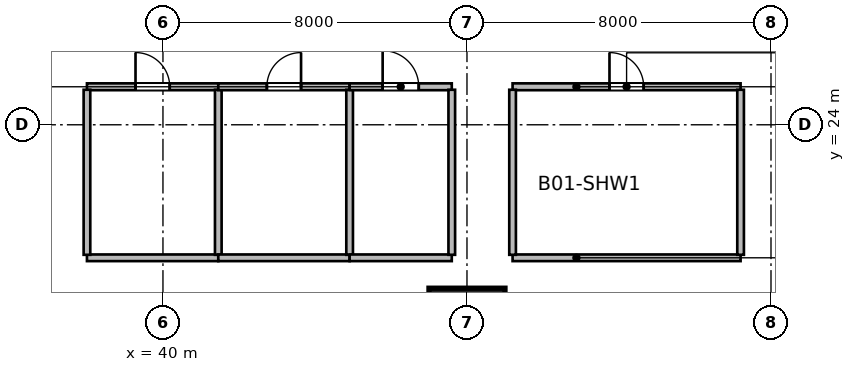
"""IFC4 building model, lengths in metres.
Left out: names, types, materials, properties, quantities, classifications, styles, units other than length and angle.
Written with IfcOpenShell. Run it as: python <this file> out.ifc"""

import sys

from ifc_helpers import new_model, si_unit, direction, frame, frame_2d, origin, origin_2d, place, context, subcontext, project, spatial, rectangle, extrude, source, transform, mapped, element, fill, save


model = new_model("IFC4")
c1 = context("Model", 3, precision=1e-05, world=origin(), true_north=direction((0.0, 1.0)))
c2 = subcontext(c1, "Body", "Model", "MODEL_VIEW")
j1 = project(units=[si_unit("LENGTHUNIT", "METRE"), si_unit("PLANEANGLEUNIT", "RADIAN")], contexts=[c1])
p1 = place(None, origin())
s1 = spatial("IfcSite", under=j1, at=p1, CompositionType="ELEMENT")
p2 = place(p1, origin())
s2 = spatial("IfcBuilding", under=s1, at=p2, CompositionType="ELEMENT")
p3 = place(p2, frame((0.0, 0.0, -5.0)))
s3 = spatial("IfcBuildingStorey", under=s2, at=p3, CompositionType="ELEMENT", Elevation=-5.0)
m1 = source(origin(), c2, "Body", "SweptSolid", [
    extrude(rectangle(XDim=2.0, YDim=2.0, at=origin_2d()), origin(), (0.0, 0.0, 1.0), 5.0),
])
p4 = place(p3, frame((48.0, 18.7, 0.0), z_axis=(0.0, 0.0, 1.0), x_axis=(0.0, -1.0, 0.0)))
e1 = element("IfcColumn", 1, at=p4, inside=s3, PredefinedType="COLUMN", context=c2, shape_type="MappedRepresentation", body=[
    mapped(m1, transform((0.0, 0.0, 0.0), scale=1.0)),
])
m2 = source(origin(), c2, "Body", "SweptSolid", [
    extrude(rectangle(XDim=6.0, YDim=0.175, at=frame_2d((3.0, 0.0))), origin(), (0.0, 0.0, 1.0), 4.7),
])
p5 = place(p3, frame((49.2, 20.5, 0.0), z_axis=(0.0, 0.0, 1.0), x_axis=(1.0, 0.0, 0.0)))
e2 = element("IfcWall", 2, at=p5, inside=s3, PredefinedType="PARTITIONING", context=c2, shape_type="MappedRepresentation", body=[
    mapped(m2, transform((0.0, 0.0, 0.0), scale=1.0)),
])
m3 = source(origin(), c2, "Body", "SweptSolid", [
    extrude(rectangle(XDim=6.0, YDim=0.18, at=frame_2d((3.0, 0.0))), origin(), (0.0, 0.0, 1.0), 4.7),
])
p6 = place(p3, frame((49.2, 25.0, 0.0), z_axis=(0.0, 0.0, 1.0), x_axis=(1.0, 0.0, 0.0)))
e3 = element("IfcWall", 3, at=p6, inside=s3, PredefinedType="PLUMBINGWALL", context=c2, shape_type="MappedRepresentation", body=[
    mapped(m3, transform((0.0, 0.0, 0.0), scale=1.0)),
])
p7 = place(p6, frame((2.55, 0.0, 0.0)))
e4 = element("IfcOpeningElement", 4, at=p7, cuts=e3, PredefinedType="OPENING", context=c2, shape_type="SweptSolid", body=[
    extrude(rectangle(XDim=0.9, YDim=2.08, at=frame_2d((0.45, 1.04))), frame((0.0, 0.1, 0.0), z_axis=(0.0, -1.0, 0.0), x_axis=(1.0, 0.0, 0.0)), (0.0, 0.0, 1.0), 0.2),
])
m4 = source(origin(), c2, "Body", "SweptSolid", [
    extrude(rectangle(XDim=4.343, YDim=0.175, at=frame_2d((2.171, 0.0))), origin(), (0.0, 0.0, 1.0), 4.7),
])
for number, where, z_axis, x_axis in (
    (5, (49.2, 20.579, 0.0), (0.0, 0.0, 1.0), (0.0, 1.0, 0.0)),
    (6, (55.2, 20.579, 0.0), (0.0, 0.0, 1.0), (0.0, 1.0, 0.0)),
):
    element("IfcWall", number, at=place(p3, frame(where, z_axis=z_axis, x_axis=x_axis)), inside=s3, PredefinedType="PARTITIONING", context=c2, shape_type="MappedRepresentation", body=[
        mapped(m4, transform((0.0, 0.0, 0.0), scale=1.0)),
    ])
m5 = source(origin(), c2, "Body", "SweptSolid", [
    extrude(rectangle(XDim=3.456, YDim=0.175, at=frame_2d((1.728, 0.0))), origin(), (0.0, 0.0, 1.0), 4.7),
])
p8 = place(p3, frame((38.0, 20.5, 0.0), z_axis=(0.0, 0.0, 1.0), x_axis=(1.0, 0.0, 0.0)))
e7 = element("IfcWall", 7, at=p8, inside=s3, PredefinedType="PARTITIONING", context=c2, shape_type="MappedRepresentation", body=[
    mapped(m5, transform((0.0, 0.0, 0.0), scale=1.0)),
])
m6 = source(origin(), c2, "Body", "SweptSolid", [
    extrude(rectangle(XDim=3.456, YDim=0.18, at=frame_2d((1.728, 0.0))), origin(), (0.0, 0.0, 1.0), 4.7),
])
p9 = place(p3, frame((38.0, 25.0, 0.0), z_axis=(0.0, 0.0, 1.0), x_axis=(1.0, 0.0, 0.0)))
e8 = element("IfcWall", 8, at=p9, inside=s3, PredefinedType="PLUMBINGWALL", context=c2, shape_type="MappedRepresentation", body=[
    mapped(m6, transform((0.0, 0.0, 0.0), scale=1.0)),
])
p10 = place(p9, frame((1.278, 0.0, 0.0)))
e9 = element("IfcOpeningElement", 9, at=p10, cuts=e8, PredefinedType="OPENING", context=c2, shape_type="SweptSolid", body=[
    extrude(rectangle(XDim=0.9, YDim=2.08, at=frame_2d((0.45, 1.04))), frame((0.0, 0.1, 0.0), z_axis=(0.0, -1.0, 0.0), x_axis=(1.0, 0.0, 0.0)), (0.0, 0.0, 1.0), 0.2),
])
for number, where, z_axis, x_axis in (
    (10, (38.0, 20.579, 0.0), (0.0, 0.0, 1.0), (0.0, 1.0, 0.0)),
    (11, (41.456, 20.579, 0.0), (0.0, 0.0, 1.0), (0.0, 1.0, 0.0)),
):
    element("IfcWall", number, at=place(p3, frame(where, z_axis=z_axis, x_axis=x_axis)), inside=s3, PredefinedType="PARTITIONING", context=c2, shape_type="MappedRepresentation", body=[
        mapped(m4, transform((0.0, 0.0, 0.0), scale=1.0)),
    ])
p11 = place(p3, frame((41.456, 20.5, 0.0), z_axis=(0.0, 0.0, 1.0), x_axis=(1.0, 0.0, 0.0)))
e12 = element("IfcWall", 12, at=p11, inside=s3, PredefinedType="PARTITIONING", context=c2, shape_type="MappedRepresentation", body=[
    mapped(m5, transform((0.0, 0.0, 0.0), scale=1.0)),
])
p12 = place(p3, frame((41.456, 25.0, 0.0), z_axis=(0.0, 0.0, 1.0), x_axis=(1.0, 0.0, 0.0)))
e13 = element("IfcWall", 13, at=p12, inside=s3, PredefinedType="PLUMBINGWALL", context=c2, shape_type="MappedRepresentation", body=[
    mapped(m6, transform((0.0, 0.0, 0.0), scale=1.0)),
])
p13 = place(p12, frame((1.278, 0.0, 0.0)))
e14 = element("IfcOpeningElement", 14, at=p13, cuts=e13, PredefinedType="OPENING", context=c2, shape_type="SweptSolid", body=[
    extrude(rectangle(XDim=0.9, YDim=2.08, at=frame_2d((0.45, 1.04))), frame((0.0, 0.1, 0.0), z_axis=(0.0, -1.0, 0.0), x_axis=(1.0, 0.0, 0.0)), (0.0, 0.0, 1.0), 0.2),
])
p14 = place(p3, frame((44.912, 20.579, 0.0), z_axis=(0.0, 0.0, 1.0), x_axis=(0.0, 1.0, 0.0)))
e15 = element("IfcWall", 15, at=p14, inside=s3, PredefinedType="PARTITIONING", context=c2, shape_type="MappedRepresentation", body=[
    mapped(m4, transform((0.0, 0.0, 0.0), scale=1.0)),
])
m7 = source(origin(), c2, "Body", "SweptSolid", [
    extrude(rectangle(XDim=2.688, YDim=0.175, at=frame_2d((1.344, 0.0))), origin(), (0.0, 0.0, 1.0), 4.7),
])
p15 = place(p3, frame((44.912, 20.5, 0.0), z_axis=(0.0, 0.0, 1.0), x_axis=(1.0, 0.0, 0.0)))
e16 = element("IfcWall", 16, at=p15, inside=s3, PredefinedType="PARTITIONING", context=c2, shape_type="MappedRepresentation", body=[
    mapped(m7, transform((0.0, 0.0, 0.0), scale=1.0)),
])
m8 = source(origin(), c2, "Body", "SweptSolid", [
    extrude(rectangle(XDim=2.688, YDim=0.18, at=frame_2d((1.344, 0.0))), origin(), (0.0, 0.0, 1.0), 4.7),
])
p16 = place(p3, frame((44.912, 25.0, 0.0), z_axis=(0.0, 0.0, 1.0), x_axis=(1.0, 0.0, 0.0)))
e17 = element("IfcWall", 17, at=p16, inside=s3, PredefinedType="PLUMBINGWALL", context=c2, shape_type="MappedRepresentation", body=[
    mapped(m8, transform((0.0, 0.0, 0.0), scale=1.0)),
])
p17 = place(p16, frame((0.869, 0.0, 0.0)))
e18 = element("IfcOpeningElement", 18, at=p17, cuts=e17, PredefinedType="OPENING", context=c2, shape_type="SweptSolid", body=[
    extrude(rectangle(XDim=0.95, YDim=2.12, at=frame_2d((0.475, 1.06))), frame((0.0, 0.1, 0.0), z_axis=(0.0, -1.0, 0.0), x_axis=(1.0, 0.0, 0.0)), (0.0, 0.0, 1.0), 0.2),
])
m9 = source(origin(), c2, "Body", "SweptSolid", [
    extrude(rectangle(XDim=4.343, YDim=0.175, at=frame_2d((2.171, 0.0))), origin(), (0.0, 0.0, 1.0), 3.78),
])
p18 = place(p3, frame((47.6, 20.579, 0.0), z_axis=(0.0, 0.0, 1.0), x_axis=(0.0, 1.0, 0.0)))
e19 = element("IfcWall", 19, at=p18, inside=s3, PredefinedType="PARTITIONING", context=c2, shape_type="MappedRepresentation", body=[
    mapped(m9, transform((0.0, 0.0, 0.0), scale=1.0)),
])
m10 = source(origin(), c2, "Body", "SweptSolid", [
    extrude(rectangle(XDim=0.9, YDim=2.08, at=frame_2d((0.45, 1.04))), frame((0.0, 0.025, 0.0), z_axis=(0.0, -1.0, 0.0), x_axis=(1.0, 0.0, 0.0)), (0.0, 0.0, 1.0), 0.05),
])
p19 = place(p7, origin())
e20 = element("IfcDoor", 20, at=p19, inside=s3, OperationType="SINGLE_SWING_LEFT", PredefinedType="DOOR", context=c2, shape_type="MappedRepresentation", body=[
    mapped(m10, transform((0.0, 0.0, 0.0), scale=1.0)),
])
fill(e4, e20)
p20 = place(p10, origin())
e21 = element("IfcDoor", 21, at=p20, inside=s3, OperationType="SINGLE_SWING_LEFT", PredefinedType="DOOR", context=c2, shape_type="MappedRepresentation", body=[
    mapped(m10, transform((0.0, 0.0, 0.0), scale=1.0)),
])
fill(e9, e21)
p21 = place(p13, origin())
e22 = element("IfcDoor", 22, at=p21, inside=s3, OperationType="SINGLE_SWING_RIGHT", PredefinedType="DOOR", context=c2, shape_type="MappedRepresentation", body=[
    mapped(m10, transform((0.0, 0.0, 0.0), scale=1.0)),
])
fill(e14, e22)
m11 = source(origin(), c2, "Body", "SweptSolid", [
    extrude(rectangle(XDim=0.95, YDim=2.12, at=frame_2d((0.475, 1.06))), frame((0.0, 0.025, 0.0), z_axis=(0.0, -1.0, 0.0), x_axis=(1.0, 0.0, 0.0)), (0.0, 0.0, 1.0), 0.05),
])
p22 = place(p17, origin())
e23 = element("IfcDoor", 23, at=p22, inside=s3, OperationType="SINGLE_SWING_LEFT", PredefinedType="DOOR", context=c2, shape_type="MappedRepresentation", body=[
    mapped(m11, transform((0.0, 0.0, 0.0), scale=1.0)),
])
fill(e18, e23)
save(model, sys.argv[1])
